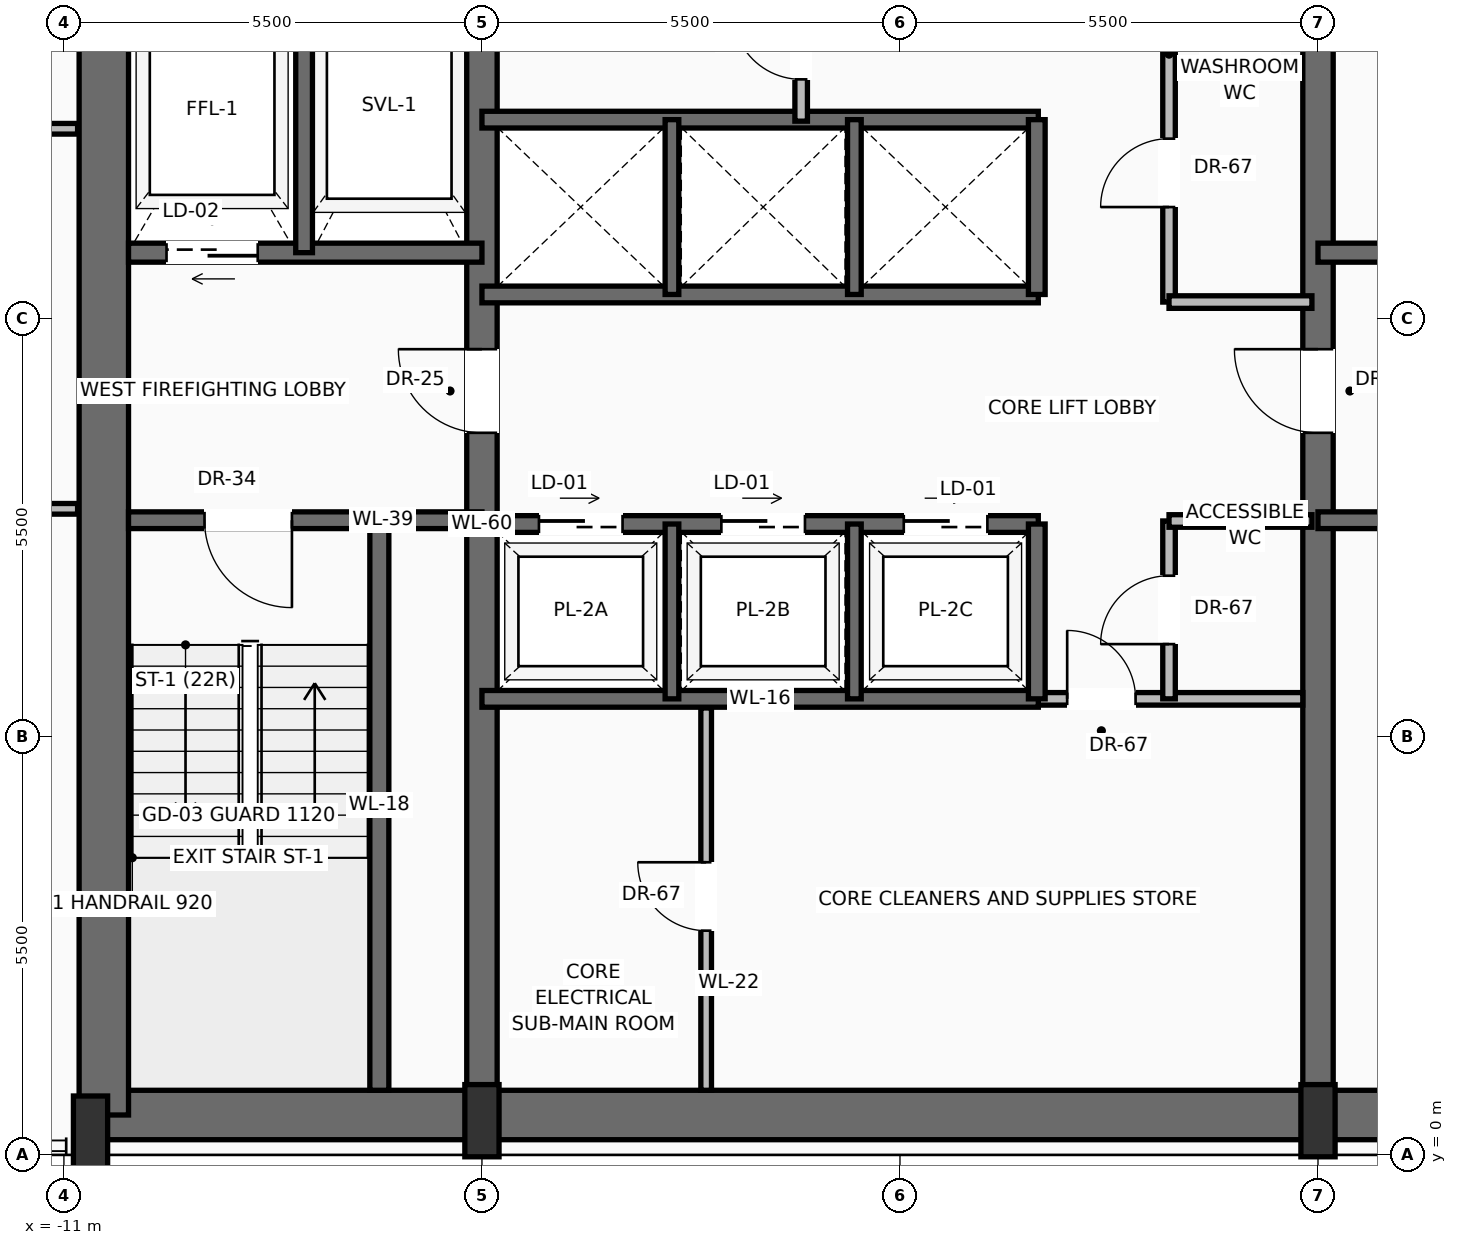
"""IFC4 building model, lengths in metres.
Left out: names, types, materials, properties, quantities, classifications, styles, units other than length and angle.
Written with IfcOpenShell. Run it as: python <this file> out.ifc"""

import sys

from ifc_helpers import new_model, si_unit, direction, frame, frame_2d, origin, origin_2d, place, context, subcontext, project, spatial, rectangle, extrude, source, transform, mapped, element, fill, save


model = new_model("IFC4")
c1 = context("Model", 3, precision=1e-05, world=origin(), true_north=direction((0.0, 1.0)))
c2 = subcontext(c1, "Body", "Model", "MODEL_VIEW")
j1 = project(units=[si_unit("LENGTHUNIT", "METRE"), si_unit("PLANEANGLEUNIT", "RADIAN")], contexts=[c1])
p1 = place(None, origin())
s1 = spatial("IfcSite", under=j1, at=p1, CompositionType="ELEMENT")
p2 = place(p1, origin())
s2 = spatial("IfcBuilding", under=s1, at=p2, CompositionType="ELEMENT")
p3 = place(p2, frame((0.0, 0.0, 129.3)))
s3 = spatial("IfcBuildingStorey", under=s2, at=p3, CompositionType="ELEMENT", Elevation=129.3)
p4 = place(p3, frame((-10.65, 0.525, 0.0), z_axis=(0.0, 0.0, 1.0), x_axis=(1.0, 0.0, 0.0)))
e1 = element("IfcWall", 1, at=p4, inside=s3, PredefinedType="SHEAR", context=c2, shape_type="SweptSolid", body=[
    extrude(rectangle(XDim=21.3, YDim=0.65, at=frame_2d((10.65, 0.0))), origin(), (0.0, 0.0, 1.0), 3.47),
])
p5 = place(p3, frame((-10.475, 0.525, 0.0), z_axis=(0.0, 0.0, 1.0), x_axis=(0.0, 1.0, 0.0)))
e2 = element("IfcWall", 2, at=p5, inside=s3, PredefinedType="SHEAR", context=c2, shape_type="SweptSolid", body=[
    extrude(rectangle(XDim=15.55, YDim=0.65, at=frame_2d((7.775, 0.0))), origin(), (0.0, 0.0, 1.0), 3.47),
])
p6 = place(p3, frame((-5.5, 0.525, 0.0), z_axis=(0.0, 0.0, 1.0), x_axis=(0.0, 1.0, 0.0)))
e3 = element("IfcWall", 3, at=p6, inside=s3, PredefinedType="SHEAR", context=c2, shape_type="SweptSolid", body=[
    extrude(rectangle(XDim=15.55, YDim=0.4, at=frame_2d((7.775, 0.0))), origin(), (0.0, 0.0, 1.0), 3.47),
])
p7 = place(p6, frame((8.975, 0.0, 0.0)))
e4 = element("IfcOpeningElement", 4, at=p7, cuts=e3, PredefinedType="OPENING", context=c2, shape_type="SweptSolid", body=[
    extrude(rectangle(XDim=1.1, YDim=2.2, at=frame_2d((0.55, 1.1))), frame((0.0, 0.21, 0.0), z_axis=(0.0, -1.0, 0.0), x_axis=(1.0, 0.0, 0.0)), (0.0, 0.0, 1.0), 0.42),
])
p8 = place(p3, frame((5.5, 0.525, 0.0), z_axis=(0.0, 0.0, 1.0), x_axis=(0.0, 1.0, 0.0)))
e5 = element("IfcWall", 5, at=p8, inside=s3, PredefinedType="SHEAR", context=c2, shape_type="SweptSolid", body=[
    extrude(rectangle(XDim=15.55, YDim=0.4, at=frame_2d((7.775, 0.0))), origin(), (0.0, 0.0, 1.0), 3.47),
])
p9 = place(p8, frame((8.975, 0.0, 0.0)))
e6 = element("IfcOpeningElement", 6, at=p9, cuts=e5, PredefinedType="OPENING", context=c2, shape_type="SweptSolid", body=[
    extrude(rectangle(XDim=1.1, YDim=2.2, at=frame_2d((0.55, 1.1))), frame((0.0, 0.21, 0.0), z_axis=(0.0, -1.0, 0.0), x_axis=(1.0, 0.0, 0.0)), (0.0, 0.0, 1.0), 0.42),
])
m1 = source(origin(), c2, "Body", "SweptSolid", [
    extrude(rectangle(XDim=0.45, YDim=0.95, at=origin_2d()), origin(), (0.0, 0.0, 1.0), 3.7),
])
for number, where, z_axis, x_axis in (
    (7, (-10.65, 0.3, 0.0), (0.0, 0.0, 1.0), (1.0, 0.0, 0.0)),
    (8, (-5.5, 0.45, 0.0), (0.0, 0.0, 1.0), (1.0, 0.0, 0.0)),
    (9, (5.5, 0.45, 0.0), (0.0, 0.0, 1.0), (1.0, 0.0, 0.0)),
):
    element("IfcColumn", number, at=place(p3, frame(where, z_axis=z_axis, x_axis=x_axis)), inside=s3, PredefinedType="PILASTER", context=c2, shape_type="MappedRepresentation", body=[
        mapped(m1, transform((0.0, 0.0, 0.0), scale=1.0)),
    ])
p10 = place(p3, frame((-6.85, 0.85, 0.0), z_axis=(0.0, 0.0, 1.0), x_axis=(0.0, 1.0, 0.0)))
e10 = element("IfcWall", 10, at=p10, inside=s3, PredefinedType="SOLIDWALL", context=c2, shape_type="SweptSolid", body=[
    extrude(rectangle(XDim=7.5, YDim=0.25, at=frame_2d((3.75, 0.0))), origin(), (0.0, 0.0, 1.0), 3.47),
])
p11 = place(p3, frame((-5.5, 8.35, 0.0), z_axis=(0.0, 0.0, 1.0), x_axis=(-1.0, 0.0, 0.0)))
e11 = element("IfcWall", 11, at=p11, inside=s3, PredefinedType="SOLIDWALL", context=c2, shape_type="SweptSolid", body=[
    extrude(rectangle(XDim=4.65, YDim=0.22, at=frame_2d((2.325, 0.0))), origin(), (0.0, 0.0, 1.0), 3.47),
])
p12 = place(p11, frame((2.5, 0.0, 0.0)))
e12 = element("IfcOpeningElement", 12, at=p12, cuts=e11, PredefinedType="OPENING", context=c2, shape_type="SweptSolid", body=[
    extrude(rectangle(XDim=1.15, YDim=2.2, at=frame_2d((0.575, 1.1))), frame((0.0, 0.12, 0.0), z_axis=(0.0, -1.0, 0.0), x_axis=(1.0, 0.0, 0.0)), (0.0, 0.0, 1.0), 0.24),
])
p13 = place(p3, frame((-5.5, 11.87, 0.0), z_axis=(0.0, 0.0, 1.0), x_axis=(-1.0, 0.0, 0.0)))
e13 = element("IfcWall", 13, at=p13, inside=s3, PredefinedType="SOLIDWALL", context=c2, shape_type="SweptSolid", body=[
    extrude(rectangle(XDim=4.65, YDim=0.25, at=frame_2d((2.325, 0.0))), origin(), (0.0, 0.0, 1.0), 3.47),
])
p14 = place(p13, frame((2.95, 0.0, 0.0)))
e14 = element("IfcOpeningElement", 14, at=p14, cuts=e13, PredefinedType="OPENING", context=c2, shape_type="SweptSolid", body=[
    extrude(rectangle(XDim=1.2, YDim=2.25, at=frame_2d((0.6, 1.125))), frame((0.0, 0.135, 0.0), z_axis=(0.0, -1.0, 0.0), x_axis=(1.0, 0.0, 0.0)), (0.0, 0.0, 1.0), 0.27),
])
p15 = place(p3, frame((-7.84, 11.87, 0.0), z_axis=(0.0, 0.0, 1.0), x_axis=(0.0, 1.0, 0.0)))
e15 = element("IfcWall", 15, at=p15, inside=s3, PredefinedType="SOLIDWALL", context=c2, shape_type="SweptSolid", body=[
    extrude(rectangle(XDim=3.88, YDim=0.22, at=frame_2d((1.94, 0.0))), origin(), (0.0, 0.0, 1.0), 3.47),
])
p16 = place(p3, frame((10.15, 8.35, 0.0), z_axis=(0.0, 0.0, 1.0), x_axis=(-1.0, 0.0, 0.0)))
e16 = element("IfcWall", 16, at=p16, inside=s3, PredefinedType="SOLIDWALL", context=c2, shape_type="SweptSolid", body=[
    extrude(rectangle(XDim=4.65, YDim=0.22, at=frame_2d((2.325, 0.0))), origin(), (0.0, 0.0, 1.0), 3.47),
])
p17 = place(p16, frame((1.0, 0.0, 0.0)))
e17 = element("IfcOpeningElement", 17, at=p17, cuts=e16, PredefinedType="OPENING", context=c2, shape_type="SweptSolid", body=[
    extrude(rectangle(XDim=1.15, YDim=2.2, at=frame_2d((0.575, 1.1))), frame((0.0, 0.12, 0.0), z_axis=(0.0, -1.0, 0.0), x_axis=(1.0, 0.0, 0.0)), (0.0, 0.0, 1.0), 0.24),
])
p18 = place(p3, frame((10.15, 11.87, 0.0), z_axis=(0.0, 0.0, 1.0), x_axis=(-1.0, 0.0, 0.0)))
e18 = element("IfcWall", 18, at=p18, inside=s3, PredefinedType="SOLIDWALL", context=c2, shape_type="SweptSolid", body=[
    extrude(rectangle(XDim=4.65, YDim=0.25, at=frame_2d((2.325, 0.0))), origin(), (0.0, 0.0, 1.0), 3.47),
])
p19 = place(p18, frame((0.5, 0.0, 0.0)))
e19 = element("IfcOpeningElement", 19, at=p19, cuts=e18, PredefinedType="OPENING", context=c2, shape_type="SweptSolid", body=[
    extrude(rectangle(XDim=1.2, YDim=2.25, at=frame_2d((0.6, 1.125))), frame((0.0, 0.135, 0.0), z_axis=(0.0, -1.0, 0.0), x_axis=(1.0, 0.0, 0.0)), (0.0, 0.0, 1.0), 0.27),
])
p20 = place(p3, frame((1.82, 6.0, 0.0), z_axis=(0.0, 0.0, 1.0), x_axis=(1.0, 0.0, 0.0)))
e20 = element("IfcWall", 20, at=p20, inside=s3, PredefinedType="PARTITIONING", context=c2, shape_type="SweptSolid", body=[
    extrude(rectangle(XDim=3.48, YDim=0.165, at=frame_2d((1.74, 0.0))), origin(), (0.0, 0.0, 1.0), 3.462),
])
p21 = place(p20, frame((0.38, 0.0, 0.0)))
e21 = element("IfcOpeningElement", 21, at=p21, cuts=e20, PredefinedType="OPENING", context=c2, shape_type="SweptSolid", body=[
    extrude(rectangle(XDim=0.9, YDim=2.1, at=frame_2d((0.45, 1.05))), frame((0.0, 0.093, 0.0), z_axis=(0.0, -1.0, 0.0), x_axis=(1.0, 0.0, 0.0)), (0.0, 0.0, 1.0), 0.185),
])
p22 = place(p3, frame((-2.55, 0.85, 0.0), z_axis=(0.0, 0.0, 1.0), x_axis=(0.0, 1.0, 0.0)))
e22 = element("IfcWall", 22, at=p22, inside=s3, PredefinedType="PARTITIONING", context=c2, shape_type="SweptSolid", body=[
    extrude(rectangle(XDim=5.03, YDim=0.14, at=frame_2d((2.515, 0.0))), origin(), (0.0, 0.0, 1.0), 3.462),
])
p23 = place(p22, frame((2.1, 0.0, 0.0)))
e23 = element("IfcOpeningElement", 23, at=p23, cuts=e22, PredefinedType="OPENING", context=c2, shape_type="SweptSolid", body=[
    extrude(rectangle(XDim=0.9, YDim=2.1, at=frame_2d((0.45, 1.05))), frame((0.0, 0.08, 0.0), z_axis=(0.0, -1.0, 0.0), x_axis=(1.0, 0.0, 0.0)), (0.0, 0.0, 1.0), 0.16),
])
p24 = place(p3, frame((3.54, 6.0, 0.0), z_axis=(0.0, 0.0, 1.0), x_axis=(0.0, 1.0, 0.0)))
e24 = element("IfcWall", 24, at=p24, inside=s3, PredefinedType="PARTITIONING", context=c2, shape_type="SweptSolid", body=[
    extrude(rectangle(XDim=2.34, YDim=0.165, at=frame_2d((1.17, 0.0))), origin(), (0.0, 0.0, 1.0), 3.462),
])
p25 = place(p24, frame((0.72, 0.0, 0.0)))
e25 = element("IfcOpeningElement", 25, at=p25, cuts=e24, PredefinedType="OPENING", context=c2, shape_type="SweptSolid", body=[
    extrude(rectangle(XDim=0.9, YDim=2.1, at=frame_2d((0.45, 1.05))), frame((0.0, 0.093, 0.0), z_axis=(0.0, -1.0, 0.0), x_axis=(1.0, 0.0, 0.0)), (0.0, 0.0, 1.0), 0.185),
])
p26 = place(p3, frame((3.54, 8.34, 0.0), z_axis=(0.0, 0.0, 1.0), x_axis=(1.0, 0.0, 0.0)))
e26 = element("IfcWall", 26, at=p26, inside=s3, PredefinedType="PARTITIONING", context=c2, shape_type="SweptSolid", body=[
    extrude(rectangle(XDim=1.88, YDim=0.165, at=frame_2d((0.94, 0.0))), origin(), (0.0, 0.0, 1.0), 3.462),
])
p27 = place(p3, frame((-5.5, 6.0, 0.0), z_axis=(0.0, 0.0, 1.0), x_axis=(1.0, 0.0, 0.0)))
e27 = element("IfcWall", 27, at=p27, inside=s3, PredefinedType="SOLIDWALL", context=c2, shape_type="SweptSolid", body=[
    extrude(rectangle(XDim=7.32, YDim=0.22, at=frame_2d((3.66, 0.0))), origin(), (0.0, 0.0, 1.0), 3.47),
])
p28 = place(p3, frame((-5.5, 8.3, 0.0), z_axis=(0.0, 0.0, 1.0), x_axis=(1.0, 0.0, 0.0)))
e28 = element("IfcWall", 28, at=p28, inside=s3, PredefinedType="SOLIDWALL", context=c2, shape_type="SweptSolid", body=[
    extrude(rectangle(XDim=7.32, YDim=0.22, at=frame_2d((3.66, 0.0))), origin(), (0.0, 0.0, 1.0), 3.47),
])
p29 = place(p28, frame((0.75, 0.0, 0.0)))
e29 = element("IfcOpeningElement", 29, at=p29, cuts=e28, PredefinedType="OPENING", context=c2, shape_type="SweptSolid", body=[
    extrude(rectangle(XDim=1.1, YDim=2.2, at=frame_2d((0.55, 1.1))), frame((0.0, 0.12, 0.0), z_axis=(0.0, -1.0, 0.0), x_axis=(1.0, 0.0, 0.0)), (0.0, 0.0, 1.0), 0.24),
])
p30 = place(p28, frame((3.15, 0.0, 0.0)))
e30 = element("IfcOpeningElement", 30, at=p30, cuts=e28, PredefinedType="OPENING", context=c2, shape_type="SweptSolid", body=[
    extrude(rectangle(XDim=1.1, YDim=2.2, at=frame_2d((0.55, 1.1))), frame((0.0, 0.12, 0.0), z_axis=(0.0, -1.0, 0.0), x_axis=(1.0, 0.0, 0.0)), (0.0, 0.0, 1.0), 0.24),
])
p31 = place(p28, frame((5.55, 0.0, 0.0)))
e31 = element("IfcOpeningElement", 31, at=p31, cuts=e28, PredefinedType="OPENING", context=c2, shape_type="SweptSolid", body=[
    extrude(rectangle(XDim=1.1, YDim=2.2, at=frame_2d((0.55, 1.1))), frame((0.0, 0.12, 0.0), z_axis=(0.0, -1.0, 0.0), x_axis=(1.0, 0.0, 0.0)), (0.0, 0.0, 1.0), 0.24),
])
p32 = place(p3, frame((1.8, 6.0, 0.0), z_axis=(0.0, 0.0, 1.0), x_axis=(0.0, 1.0, 0.0)))
e32 = element("IfcWall", 32, at=p32, inside=s3, PredefinedType="SOLIDWALL", context=c2, shape_type="SweptSolid", body=[
    extrude(rectangle(XDim=2.3, YDim=0.22, at=frame_2d((1.15, 0.0))), origin(), (0.0, 0.0, 1.0), 3.47),
])
for number, where, z_axis, x_axis in (
    (33, (-3.0, 6.0, 0.0), (0.0, 0.0, 1.0), (0.0, 1.0, 0.0)),
    (34, (-0.6, 6.0, 0.0), (0.0, 0.0, 1.0), (0.0, 1.0, 0.0)),
):
    element("IfcWall", number, at=place(p3, frame(where, z_axis=z_axis, x_axis=x_axis)), inside=s3, PredefinedType="SOLIDWALL", context=c2, shape_type="SweptSolid", body=[
        extrude(rectangle(XDim=2.3, YDim=0.18, at=frame_2d((1.15, 0.0))), origin(), (0.0, 0.0, 1.0), 3.47),
    ])
for number, where, z_axis, x_axis in (
    (35, (-5.5, 11.32, 0.0), (0.0, 0.0, 1.0), (1.0, 0.0, 0.0)),
    (36, (-5.5, 13.62, 0.0), (0.0, 0.0, 1.0), (1.0, 0.0, 0.0)),
):
    element("IfcWall", number, at=place(p3, frame(where, z_axis=z_axis, x_axis=x_axis)), inside=s3, PredefinedType="SOLIDWALL", context=c2, shape_type="SweptSolid", body=[
        extrude(rectangle(XDim=7.32, YDim=0.22, at=frame_2d((3.66, 0.0))), origin(), (0.0, 0.0, 1.0), 3.47),
    ])
p33 = place(p3, frame((1.8, 11.32, 0.0), z_axis=(0.0, 0.0, 1.0), x_axis=(0.0, 1.0, 0.0)))
e37 = element("IfcWall", 37, at=p33, inside=s3, PredefinedType="SOLIDWALL", context=c2, shape_type="SweptSolid", body=[
    extrude(rectangle(XDim=2.3, YDim=0.22, at=frame_2d((1.15, 0.0))), origin(), (0.0, 0.0, 1.0), 3.47),
])
for number, where, z_axis, x_axis in (
    (38, (-3.0, 11.32, 0.0), (0.0, 0.0, 1.0), (0.0, 1.0, 0.0)),
    (39, (-0.6, 11.32, 0.0), (0.0, 0.0, 1.0), (0.0, 1.0, 0.0)),
):
    element("IfcWall", number, at=place(p3, frame(where, z_axis=z_axis, x_axis=x_axis)), inside=s3, PredefinedType="SOLIDWALL", context=c2, shape_type="SweptSolid", body=[
        extrude(rectangle(XDim=2.3, YDim=0.18, at=frame_2d((1.15, 0.0))), origin(), (0.0, 0.0, 1.0), 3.47),
    ])
p34 = place(p3, frame((-1.3, 13.6, 0.0), z_axis=(0.0, 0.0, 1.0), x_axis=(0.0, 1.0, 0.0)))
e40 = element("IfcWall", 40, at=p34, inside=s3, PredefinedType="PARTITIONING", context=c2, shape_type="SweptSolid", body=[
    extrude(rectangle(XDim=2.15, YDim=0.165, at=frame_2d((1.075, 0.0))), origin(), (0.0, 0.0, 1.0), 3.462),
])
p35 = place(p34, frame((0.55, 0.0, 0.0)))
e41 = element("IfcOpeningElement", 41, at=p35, cuts=e40, PredefinedType="OPENING", context=c2, shape_type="SweptSolid", body=[
    extrude(rectangle(XDim=0.9, YDim=2.1, at=frame_2d((0.45, 1.05))), frame((0.0, 0.093, 0.0), z_axis=(0.0, -1.0, 0.0), x_axis=(1.0, 0.0, 0.0)), (0.0, 0.0, 1.0), 0.185),
])
p36 = place(p3, frame((3.54, 11.22, 0.0), z_axis=(0.0, 0.0, 1.0), x_axis=(0.0, 1.0, 0.0)))
e42 = element("IfcWall", 42, at=p36, inside=s3, PredefinedType="PARTITIONING", context=c2, shape_type="SweptSolid", body=[
    extrude(rectangle(XDim=4.53, YDim=0.165, at=frame_2d((2.265, 0.0))), origin(), (0.0, 0.0, 1.0), 3.462),
])
p37 = place(p36, frame((1.25, 0.0, 0.0)))
e43 = element("IfcOpeningElement", 43, at=p37, cuts=e42, PredefinedType="OPENING", context=c2, shape_type="SweptSolid", body=[
    extrude(rectangle(XDim=0.9, YDim=2.1, at=frame_2d((0.45, 1.05))), frame((0.0, 0.093, 0.0), z_axis=(0.0, -1.0, 0.0), x_axis=(1.0, 0.0, 0.0)), (0.0, 0.0, 1.0), 0.185),
])
p38 = place(p3, frame((3.54, 11.22, 0.0), z_axis=(0.0, 0.0, 1.0), x_axis=(1.0, 0.0, 0.0)))
e44 = element("IfcWall", 44, at=p38, inside=s3, PredefinedType="PARTITIONING", context=c2, shape_type="SweptSolid", body=[
    extrude(rectangle(XDim=1.88, YDim=0.165, at=frame_2d((0.94, 0.0))), origin(), (0.0, 0.0, 1.0), 3.462),
])
p39 = place(p3, frame((-27.138, 8.5, 0.0), z_axis=(0.0, 0.0, 1.0), x_axis=(1.0, 0.0, 0.0)))
e45 = element("IfcWall", 45, at=p39, inside=s3, PredefinedType="PARTITIONING", context=c2, shape_type="SweptSolid", body=[
    extrude(rectangle(XDim=16.318, YDim=0.14, at=frame_2d((8.159, 0.0))), origin(), (0.0, 0.0, 1.0), 3.462),
])
p40 = place(p39, frame((7.694, 0.0, 0.0)))
e46 = element("IfcOpeningElement", 46, at=p40, cuts=e45, PredefinedType="OPENING", context=c2, shape_type="SweptSolid", body=[
    extrude(rectangle(XDim=0.95, YDim=2.2, at=frame_2d((0.475, 1.1))), frame((0.0, 0.08, 0.0), z_axis=(0.0, -1.0, 0.0), x_axis=(1.0, 0.0, 0.0)), (0.0, 0.0, 1.0), 0.16),
])
p41 = place(p3, frame((-23.852, 13.5, 0.0), z_axis=(0.0, 0.0, 1.0), x_axis=(1.0, 0.0, 0.0)))
e47 = element("IfcWall", 47, at=p41, inside=s3, PredefinedType="PARTITIONING", context=c2, shape_type="SweptSolid", body=[
    extrude(rectangle(XDim=13.032, YDim=0.14, at=frame_2d((6.516, 0.0))), origin(), (0.0, 0.0, 1.0), 3.049),
])
p42 = place(p41, frame((6.051, 0.0, 0.0)))
e48 = element("IfcOpeningElement", 48, at=p42, cuts=e47, PredefinedType="OPENING", context=c2, shape_type="SweptSolid", body=[
    extrude(rectangle(XDim=0.95, YDim=2.2, at=frame_2d((0.475, 1.1))), frame((0.0, 0.08, 0.0), z_axis=(0.0, -1.0, 0.0), x_axis=(1.0, 0.0, 0.0)), (0.0, 0.0, 1.0), 0.16),
])
m2 = source(origin(), c2, "Body", "SweptSolid", [
    extrude(rectangle(XDim=1.15, YDim=2.2, at=frame_2d((0.575, 1.1))), frame((0.0, 0.025, 0.0), z_axis=(0.0, -1.0, 0.0), x_axis=(1.0, 0.0, 0.0)), (0.0, 0.0, 1.0), 0.05),
])
p43 = place(p12, origin())
e49 = element("IfcDoor", 49, at=p43, inside=s3, OperationType="SINGLE_SWING_LEFT", PredefinedType="DOOR", context=c2, shape_type="MappedRepresentation", body=[
    mapped(m2, transform((0.0, 0.0, 0.0), scale=1.0)),
])
fill(e12, e49)
m3 = source(origin(), c2, "Body", "SweptSolid", [
    extrude(rectangle(XDim=1.1, YDim=2.2, at=frame_2d((0.55, 1.1))), frame((0.0, 0.025, 0.0), z_axis=(0.0, -1.0, 0.0), x_axis=(1.0, 0.0, 0.0)), (0.0, 0.0, 1.0), 0.05),
])
p44 = place(p7, origin())
e50 = element("IfcDoor", 50, at=p44, inside=s3, OperationType="SINGLE_SWING_RIGHT", PredefinedType="DOOR", context=c2, shape_type="MappedRepresentation", body=[
    mapped(m3, transform((0.0, 0.0, 0.0), scale=1.0)),
])
fill(e4, e50)
m4 = source(origin(), c2, "Body", "SweptSolid", [
    extrude(rectangle(XDim=1.2, YDim=2.25, at=frame_2d((0.6, 1.125))), frame((0.0, 0.025, 0.0), z_axis=(0.0, -1.0, 0.0), x_axis=(1.0, 0.0, 0.0)), (0.0, 0.0, 1.0), 0.05),
])
p45 = place(p14, origin())
e51 = element("IfcDoor", 51, at=p45, inside=s3, OperationType="SLIDING_TO_LEFT", PredefinedType="DOOR", context=c2, shape_type="MappedRepresentation", body=[
    mapped(m4, transform((0.0, 0.0, 0.0), scale=1.0)),
])
fill(e14, e51)
p46 = place(p9, origin())
e52 = element("IfcDoor", 52, at=p46, inside=s3, OperationType="SINGLE_SWING_RIGHT", PredefinedType="DOOR", context=c2, shape_type="MappedRepresentation", body=[
    mapped(m3, transform((0.0, 0.0, 0.0), scale=1.0)),
])
fill(e6, e52)
m5 = source(origin(), c2, "Body", "SweptSolid", [
    extrude(rectangle(XDim=0.9, YDim=2.1, at=frame_2d((0.45, 1.05))), frame((0.0, 0.025, 0.0), z_axis=(0.0, -1.0, 0.0), x_axis=(1.0, 0.0, 0.0)), (0.0, 0.0, 1.0), 0.05),
])
p47 = place(p21, origin())
e53 = element("IfcDoor", 53, at=p47, inside=s3, OperationType="SINGLE_SWING_LEFT", PredefinedType="DOOR", context=c2, shape_type="MappedRepresentation", body=[
    mapped(m5, transform((0.0, 0.0, 0.0), scale=1.0)),
])
fill(e21, e53)
p48 = place(p23, origin())
e54 = element("IfcDoor", 54, at=p48, inside=s3, OperationType="SINGLE_SWING_RIGHT", PredefinedType="DOOR", context=c2, shape_type="MappedRepresentation", body=[
    mapped(m5, transform((0.0, 0.0, 0.0), scale=1.0)),
])
fill(e23, e54)
p49 = place(p25, origin())
e55 = element("IfcDoor", 55, at=p49, inside=s3, OperationType="SINGLE_SWING_LEFT", PredefinedType="DOOR", context=c2, shape_type="MappedRepresentation", body=[
    mapped(m5, transform((0.0, 0.0, 0.0), scale=1.0)),
])
fill(e25, e55)
m6 = source(origin(), c2, "Body", "SweptSolid", [
    extrude(rectangle(XDim=1.1, YDim=2.2, at=frame_2d((0.55, 1.1))), frame((0.0, 0.025, 0.0), z_axis=(0.0, -1.0, 0.0), x_axis=(1.0, 0.0, 0.0)), (0.0, 0.0, 1.0), 0.05),
])
p50 = place(p29, origin())
e56 = element("IfcDoor", 56, at=p50, inside=s3, OperationType="SLIDING_TO_LEFT", PredefinedType="DOOR", context=c2, shape_type="MappedRepresentation", body=[
    mapped(m6, transform((0.0, 0.0, 0.0), scale=1.0)),
])
fill(e29, e56)
p51 = place(p30, origin())
e57 = element("IfcDoor", 57, at=p51, inside=s3, OperationType="SLIDING_TO_LEFT", PredefinedType="DOOR", context=c2, shape_type="MappedRepresentation", body=[
    mapped(m6, transform((0.0, 0.0, 0.0), scale=1.0)),
])
fill(e30, e57)
p52 = place(p31, origin())
e58 = element("IfcDoor", 58, at=p52, inside=s3, OperationType="SLIDING_TO_LEFT", PredefinedType="DOOR", context=c2, shape_type="MappedRepresentation", body=[
    mapped(m6, transform((0.0, 0.0, 0.0), scale=1.0)),
])
fill(e31, e58)
p53 = place(p35, origin())
e59 = element("IfcDoor", 59, at=p53, inside=s3, OperationType="SINGLE_SWING_RIGHT", PredefinedType="DOOR", context=c2, shape_type="MappedRepresentation", body=[
    mapped(m5, transform((0.0, 0.0, 0.0), scale=1.0)),
])
fill(e41, e59)
p54 = place(p37, origin())
e60 = element("IfcDoor", 60, at=p54, inside=s3, OperationType="SINGLE_SWING_LEFT", PredefinedType="DOOR", context=c2, shape_type="MappedRepresentation", body=[
    mapped(m5, transform((0.0, 0.0, 0.0), scale=1.0)),
])
fill(e43, e60)
save(model, sys.argv[1])
